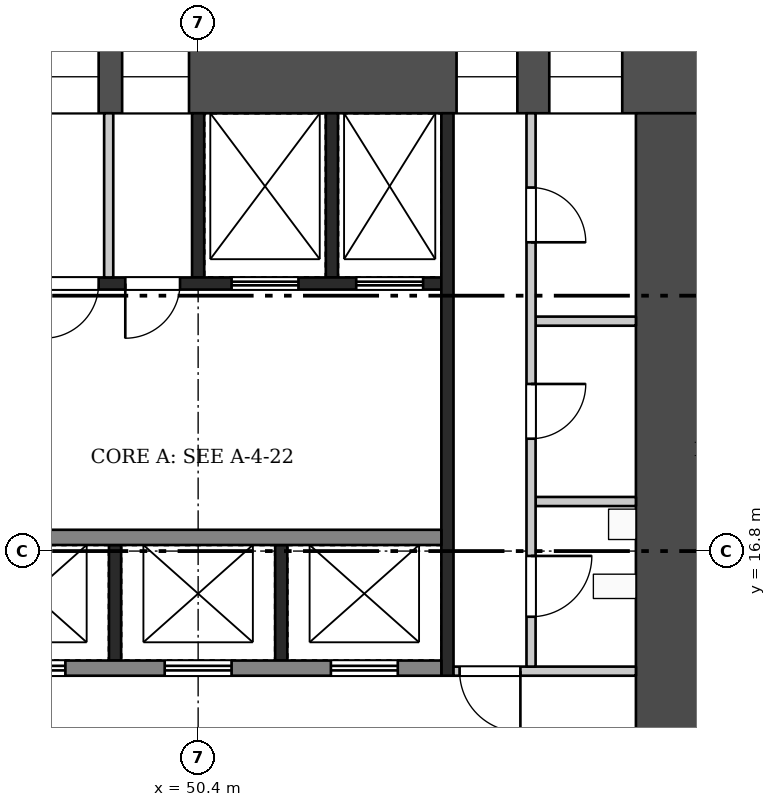
"""IFC4 building model, lengths in metres.
Left out: names, types, materials, properties, quantities, classifications, styles, units other than length and angle.
Written with IfcOpenShell. Run it as: python <this file> out.ifc"""

import sys

from ifc_helpers import new_model, si_unit, direction, frame, frame_2d, origin, place, context, subcontext, project, spatial, rectangle, extrude, element, fill, save


model = new_model("IFC4")
c1 = context("Model", 3, precision=1e-05, world=origin(), true_north=direction((0.0, 1.0)))
c2 = subcontext(c1, "Body", "Model", "MODEL_VIEW")
j1 = project(units=[si_unit("LENGTHUNIT", "METRE"), si_unit("PLANEANGLEUNIT", "RADIAN")], contexts=[c1])
p1 = place(None, origin())
s1 = spatial("IfcSite", under=j1, at=p1, CompositionType="ELEMENT")
p2 = place(p1, origin())
s2 = spatial("IfcBuilding", under=s1, at=p2, CompositionType="ELEMENT")
p3 = place(p2, frame((0.0, 0.0, 140.7)))
s3 = spatial("IfcBuildingStorey", under=s2, at=p3, CompositionType="ELEMENT", Elevation=140.7)
p4 = place(p3, frame((42.0, 24.6, 0.0), z_axis=(0.0, 0.0, 1.0), x_axis=(1.0, 0.0, 0.0)))
e1 = element("IfcWall", 1, at=p4, inside=s3, PredefinedType="SHEAR", context=c2, shape_type="SweptSolid", body=[
    extrude(rectangle(XDim=16.8, YDim=1.2, at=frame_2d((8.4, 0.0))), origin(), (0.0, 0.0, 1.0), 6.72),
])
p5 = place(p4, frame((1.8, 0.0, 0.5)))
e2 = element("IfcOpeningElement", 2, at=p5, cuts=e1, PredefinedType="OPENING", context=c2, shape_type="SweptSolid", body=[
    extrude(rectangle(XDim=1.8, YDim=2.4, at=frame_2d((0.9, 1.2))), frame((0.0, 0.61, 0.0), z_axis=(0.0, -1.0, 0.0), x_axis=(1.0, 0.0, 0.0)), (0.0, 0.0, 1.0), 1.22),
])
p6 = place(p4, frame((4.462, 0.0, 1.6)))
e3 = element("IfcOpeningElement", 3, at=p6, cuts=e1, PredefinedType="OPENING", context=c2, shape_type="SweptSolid", body=[
    extrude(rectangle(XDim=1.1, YDim=1.2, at=frame_2d((0.55, 0.6))), frame((0.0, 0.61, 0.0), z_axis=(0.0, -1.0, 0.0), x_axis=(1.0, 0.0, 0.0)), (0.0, 0.0, 1.0), 1.22),
])
p7 = place(p4, frame((5.864, 0.0, 1.6)))
e4 = element("IfcOpeningElement", 4, at=p7, cuts=e1, PredefinedType="OPENING", context=c2, shape_type="SweptSolid", body=[
    extrude(rectangle(XDim=0.9, YDim=1.2, at=frame_2d((0.45, 0.6))), frame((0.0, 0.61, 0.0), z_axis=(0.0, -1.0, 0.0), x_axis=(1.0, 0.0, 0.0)), (0.0, 0.0, 1.0), 1.22),
])
p8 = place(p4, frame((7.15, 0.0, 1.6)))
e5 = element("IfcOpeningElement", 5, at=p8, cuts=e1, PredefinedType="OPENING", context=c2, shape_type="SweptSolid", body=[
    extrude(rectangle(XDim=1.1, YDim=1.2, at=frame_2d((0.55, 0.6))), frame((0.0, 0.61, 0.0), z_axis=(0.0, -1.0, 0.0), x_axis=(1.0, 0.0, 0.0)), (0.0, 0.0, 1.0), 1.22),
])
p9 = place(p4, frame((12.65, 0.0, 0.6)))
e6 = element("IfcOpeningElement", 6, at=p9, cuts=e1, PredefinedType="OPENING", context=c2, shape_type="SweptSolid", body=[
    extrude(rectangle(XDim=1.0, YDim=2.1, at=frame_2d((0.5, 1.05))), frame((0.0, 0.61, 0.0), z_axis=(0.0, -1.0, 0.0), x_axis=(1.0, 0.0, 0.0)), (0.0, 0.0, 1.0), 1.22),
])
p10 = place(p4, frame((14.175, 0.0, 1.6)))
e7 = element("IfcOpeningElement", 7, at=p10, cuts=e1, PredefinedType="OPENING", context=c2, shape_type="SweptSolid", body=[
    extrude(rectangle(XDim=1.2, YDim=1.2, at=frame_2d((0.6, 0.6))), frame((0.0, 0.61, 0.0), z_axis=(0.0, -1.0, 0.0), x_axis=(1.0, 0.0, 0.0)), (0.0, 0.0, 1.0), 1.22),
])
p11 = place(p3, frame((58.2, 9.6, 0.0), z_axis=(0.0, 0.0, 1.0), x_axis=(0.0, 1.0, 0.0)))
e8 = element("IfcWall", 8, at=p11, inside=s3, PredefinedType="SHEAR", context=c2, shape_type="SweptSolid", body=[
    extrude(rectangle(XDim=14.4, YDim=1.2, at=frame_2d((7.2, 0.0))), origin(), (0.0, 0.0, 1.0), 6.72),
])
p12 = place(p11, frame((2.1, 0.0, 0.0)))
e9 = element("IfcOpeningElement", 9, at=p12, cuts=e8, PredefinedType="OPENING", context=c2, shape_type="SweptSolid", body=[
    extrude(rectangle(XDim=1.8, YDim=2.1, at=frame_2d((0.9, 1.05))), frame((0.0, 0.61, 0.0), z_axis=(0.0, -1.0, 0.0), x_axis=(1.0, 0.0, 0.0)), (0.0, 0.0, 1.0), 1.22),
])
for number, where, z_axis, x_axis in (
    (10, (49.033, 15.0, 0.0), (0.0, 0.0, 1.0), (0.0, 1.0, 0.0)),
    (11, (51.767, 15.0, 0.0), (0.0, 0.0, 1.0), (0.0, 1.0, 0.0)),
):
    element("IfcWall", number, at=place(p3, frame(where, z_axis=z_axis, x_axis=x_axis)), inside=s3, PredefinedType="SHEAR", context=c2, shape_type="SweptSolid", body=[
        extrude(rectangle(XDim=1.9, YDim=0.2, at=frame_2d((0.95, 0.0))), origin(), (0.0, 0.0, 1.0), 6.72),
    ])
p13 = place(p3, frame((46.4, 14.875, 0.0), z_axis=(0.0, 0.0, 1.0), x_axis=(1.0, 0.0, 0.0)))
e12 = element("IfcWall", 12, at=p13, inside=s3, PredefinedType="SHEAR", context=c2, shape_type="SweptSolid", body=[
    extrude(rectangle(XDim=8.0, YDim=0.25, at=frame_2d((4.0, 0.0))), origin(), (0.0, 0.0, 1.0), 6.72),
])
p14 = place(p13, frame((0.717, 0.0, 0.0)))
e13 = element("IfcOpeningElement", 13, at=p14, cuts=e12, PredefinedType="OPENING", context=c2, shape_type="SweptSolid", body=[
    extrude(rectangle(XDim=1.1, YDim=2.1, at=frame_2d((0.55, 1.05))), frame((0.0, 0.135, 0.0), z_axis=(0.0, -1.0, 0.0), x_axis=(1.0, 0.0, 0.0)), (0.0, 0.0, 1.0), 0.27),
])
p15 = place(p13, frame((3.45, 0.0, 0.0)))
e14 = element("IfcOpeningElement", 14, at=p15, cuts=e12, PredefinedType="OPENING", context=c2, shape_type="SweptSolid", body=[
    extrude(rectangle(XDim=1.1, YDim=2.1, at=frame_2d((0.55, 1.05))), frame((0.0, 0.135, 0.0), z_axis=(0.0, -1.0, 0.0), x_axis=(1.0, 0.0, 0.0)), (0.0, 0.0, 1.0), 0.27),
])
p16 = place(p13, frame((6.183, 0.0, 0.0)))
e15 = element("IfcOpeningElement", 15, at=p16, cuts=e12, PredefinedType="OPENING", context=c2, shape_type="SweptSolid", body=[
    extrude(rectangle(XDim=1.1, YDim=2.1, at=frame_2d((0.55, 1.05))), frame((0.0, 0.135, 0.0), z_axis=(0.0, -1.0, 0.0), x_axis=(1.0, 0.0, 0.0)), (0.0, 0.0, 1.0), 0.27),
])
p17 = place(p3, frame((46.4, 17.025, 0.0), z_axis=(0.0, 0.0, 1.0), x_axis=(1.0, 0.0, 0.0)))
e16 = element("IfcWall", 16, at=p17, inside=s3, PredefinedType="SHEAR", context=c2, shape_type="SweptSolid", body=[
    extrude(rectangle(XDim=8.0, YDim=0.25, at=frame_2d((4.0, 0.0))), origin(), (0.0, 0.0, 1.0), 6.72),
])
for number, where, z_axis, x_axis in (
    (17, (50.4, 21.3, 0.0), (0.0, 0.0, 1.0), (0.0, 1.0, 0.0)),
    (18, (52.6, 21.3, 0.0), (0.0, 0.0, 1.0), (0.0, 1.0, 0.0)),
):
    element("IfcWall", number, at=place(p3, frame(where, z_axis=z_axis, x_axis=x_axis)), inside=s3, PredefinedType="SHEAR", context=c2, shape_type="SweptSolid", body=[
        extrude(rectangle(XDim=2.7, YDim=0.2, at=frame_2d((1.35, 0.0))), origin(), (0.0, 0.0, 1.0), 6.72),
    ])
p18 = place(p3, frame((48.929, 21.3, 0.0), z_axis=(0.0, 0.0, 1.0), x_axis=(0.0, 1.0, 0.0)))
e19 = element("IfcWall", 19, at=p18, inside=s3, PredefinedType="PARTITIONING", context=c2, shape_type="SweptSolid", body=[
    extrude(rectangle(XDim=2.7, YDim=0.15, at=frame_2d((1.35, 0.0))), origin(), (0.0, 0.0, 1.0), 6.72),
])
p19 = place(p3, frame((46.4, 21.2, 0.0), z_axis=(0.0, 0.0, 1.0), x_axis=(1.0, 0.0, 0.0)))
e20 = element("IfcWall", 20, at=p19, inside=s3, PredefinedType="SHEAR", context=c2, shape_type="SweptSolid", body=[
    extrude(rectangle(XDim=8.0, YDim=0.2, at=frame_2d((4.0, 0.0))), origin(), (0.0, 0.0, 1.0), 6.72),
])
p20 = place(p19, frame((0.162, 0.0, 0.0)))
e21 = element("IfcOpeningElement", 21, at=p20, cuts=e20, PredefinedType="OPENING", context=c2, shape_type="SweptSolid", body=[
    extrude(rectangle(XDim=0.9, YDim=2.1, at=frame_2d((0.45, 1.05))), frame((0.0, 0.11, 0.0), z_axis=(0.0, -1.0, 0.0), x_axis=(1.0, 0.0, 0.0)), (0.0, 0.0, 1.0), 0.22),
])
p21 = place(p19, frame((1.464, 0.0, 0.0)))
e22 = element("IfcOpeningElement", 22, at=p21, cuts=e20, PredefinedType="OPENING", context=c2, shape_type="SweptSolid", body=[
    extrude(rectangle(XDim=0.9, YDim=2.1, at=frame_2d((0.45, 1.05))), frame((0.0, 0.11, 0.0), z_axis=(0.0, -1.0, 0.0), x_axis=(1.0, 0.0, 0.0)), (0.0, 0.0, 1.0), 0.22),
])
p22 = place(p19, frame((2.802, 0.0, 0.0)))
e23 = element("IfcOpeningElement", 23, at=p22, cuts=e20, PredefinedType="OPENING", context=c2, shape_type="SweptSolid", body=[
    extrude(rectangle(XDim=0.9, YDim=2.1, at=frame_2d((0.45, 1.05))), frame((0.0, 0.11, 0.0), z_axis=(0.0, -1.0, 0.0), x_axis=(1.0, 0.0, 0.0)), (0.0, 0.0, 1.0), 0.22),
])
p23 = place(p19, frame((4.55, 0.0, 0.0)))
e24 = element("IfcOpeningElement", 24, at=p23, cuts=e20, PredefinedType="OPENING", context=c2, shape_type="SweptSolid", body=[
    extrude(rectangle(XDim=1.1, YDim=2.1, at=frame_2d((0.55, 1.05))), frame((0.0, 0.11, 0.0), z_axis=(0.0, -1.0, 0.0), x_axis=(1.0, 0.0, 0.0)), (0.0, 0.0, 1.0), 0.22),
])
p24 = place(p19, frame((6.6, 0.0, 0.0)))
e25 = element("IfcOpeningElement", 25, at=p24, cuts=e20, PredefinedType="OPENING", context=c2, shape_type="SweptSolid", body=[
    extrude(rectangle(XDim=1.1, YDim=2.1, at=frame_2d((0.55, 1.05))), frame((0.0, 0.11, 0.0), z_axis=(0.0, -1.0, 0.0), x_axis=(1.0, 0.0, 0.0)), (0.0, 0.0, 1.0), 0.22),
])
p25 = place(p3, frame((54.5, 14.75, 0.0), z_axis=(0.0, 0.0, 1.0), x_axis=(0.0, 1.0, 0.0)))
e26 = element("IfcWall", 26, at=p25, inside=s3, PredefinedType="SHEAR", context=c2, shape_type="SweptSolid", body=[
    extrude(rectangle(XDim=9.25, YDim=0.2, at=frame_2d((4.625, 0.0))), origin(), (0.0, 0.0, 1.0), 6.72),
])
p26 = place(p3, frame((54.6, 14.825, 0.0), z_axis=(0.0, 0.0, 1.0), x_axis=(1.0, 0.0, 0.0)))
e27 = element("IfcWall", 27, at=p26, inside=s3, PredefinedType="PARTITIONING", context=c2, shape_type="SweptSolid", body=[
    extrude(rectangle(XDim=3.0, YDim=0.15, at=frame_2d((1.5, 0.0))), origin(), (0.0, 0.0, 1.0), 6.72),
])
p27 = place(p26, frame((0.1, 0.0, 0.0)))
e28 = element("IfcOpeningElement", 28, at=p27, cuts=e27, PredefinedType="OPENING", context=c2, shape_type="SweptSolid", body=[
    extrude(rectangle(XDim=1.0, YDim=2.1, at=frame_2d((0.5, 1.05))), frame((0.0, 0.085, 0.0), z_axis=(0.0, -1.0, 0.0), x_axis=(1.0, 0.0, 0.0)), (0.0, 0.0, 1.0), 0.17),
])
for number, where, z_axis, x_axis in (
    (29, (55.95, 17.615, 0.0), (0.0, 0.0, 1.0), (1.0, 0.0, 0.0)),
    (30, (55.95, 20.581, 0.0), (0.0, 0.0, 1.0), (1.0, 0.0, 0.0)),
):
    element("IfcWall", number, at=place(p3, frame(where, z_axis=z_axis, x_axis=x_axis)), inside=s3, PredefinedType="PARTITIONING", context=c2, shape_type="SweptSolid", body=[
        extrude(rectangle(XDim=1.65, YDim=0.15, at=frame_2d((0.825, 0.0))), origin(), (0.0, 0.0, 1.0), 6.72),
    ])
p28 = place(p3, frame((55.875, 14.9, 0.0), z_axis=(0.0, 0.0, 1.0), x_axis=(0.0, 1.0, 0.0)))
e31 = element("IfcWall", 31, at=p28, inside=s3, PredefinedType="PARTITIONING", context=c2, shape_type="SweptSolid", body=[
    extrude(rectangle(XDim=9.1, YDim=0.15, at=frame_2d((4.55, 0.0))), origin(), (0.0, 0.0, 1.0), 6.72),
])
p29 = place(p28, frame((0.82, 0.0, 0.0)))
e32 = element("IfcOpeningElement", 32, at=p29, cuts=e31, PredefinedType="OPENING", context=c2, shape_type="SweptSolid", body=[
    extrude(rectangle(XDim=1.0, YDim=2.1, at=frame_2d((0.5, 1.05))), frame((0.0, 0.085, 0.0), z_axis=(0.0, -1.0, 0.0), x_axis=(1.0, 0.0, 0.0)), (0.0, 0.0, 1.0), 0.17),
])
p30 = place(p28, frame((3.748, 0.0, 0.0)))
e33 = element("IfcOpeningElement", 33, at=p30, cuts=e31, PredefinedType="OPENING", context=c2, shape_type="SweptSolid", body=[
    extrude(rectangle(XDim=0.9, YDim=2.1, at=frame_2d((0.45, 1.05))), frame((0.0, 0.085, 0.0), z_axis=(0.0, -1.0, 0.0), x_axis=(1.0, 0.0, 0.0)), (0.0, 0.0, 1.0), 0.17),
])
p31 = place(p28, frame((6.978, 0.0, 0.0)))
e34 = element("IfcOpeningElement", 34, at=p31, cuts=e31, PredefinedType="OPENING", context=c2, shape_type="SweptSolid", body=[
    extrude(rectangle(XDim=0.9, YDim=2.1, at=frame_2d((0.45, 1.05))), frame((0.0, 0.085, 0.0), z_axis=(0.0, -1.0, 0.0), x_axis=(1.0, 0.0, 0.0)), (0.0, 0.0, 1.0), 0.17),
])
p32 = place(p14, origin())
e35 = element("IfcDoor", 35, at=p32, inside=s3, OperationType="DOUBLE_DOOR_SLIDING", PredefinedType="DOOR", context=c2, shape_type="SweptSolid", body=[
    extrude(rectangle(XDim=1.1, YDim=2.1, at=frame_2d((0.55, 1.05))), frame((0.0, 0.025, 0.0), z_axis=(0.0, -1.0, 0.0), x_axis=(1.0, 0.0, 0.0)), (0.0, 0.0, 1.0), 0.05),
])
fill(e13, e35)
p33 = place(p15, origin())
e36 = element("IfcDoor", 36, at=p33, inside=s3, OperationType="DOUBLE_DOOR_SLIDING", PredefinedType="DOOR", context=c2, shape_type="SweptSolid", body=[
    extrude(rectangle(XDim=1.1, YDim=2.1, at=frame_2d((0.55, 1.05))), frame((0.0, 0.025, 0.0), z_axis=(0.0, -1.0, 0.0), x_axis=(1.0, 0.0, 0.0)), (0.0, 0.0, 1.0), 0.05),
])
fill(e14, e36)
p34 = place(p16, origin())
e37 = element("IfcDoor", 37, at=p34, inside=s3, OperationType="DOUBLE_DOOR_SLIDING", PredefinedType="DOOR", context=c2, shape_type="SweptSolid", body=[
    extrude(rectangle(XDim=1.1, YDim=2.1, at=frame_2d((0.55, 1.05))), frame((0.0, 0.025, 0.0), z_axis=(0.0, -1.0, 0.0), x_axis=(1.0, 0.0, 0.0)), (0.0, 0.0, 1.0), 0.05),
])
fill(e15, e37)
p35 = place(p21, frame((0.9, 0.0, 0.0), z_axis=(0.0, 0.0, 1.0), x_axis=(-1.0, 0.0, 0.0)))
e38 = element("IfcDoor", 38, at=p35, inside=s3, OperationType="SINGLE_SWING_RIGHT", PredefinedType="DOOR", context=c2, shape_type="SweptSolid", body=[
    extrude(rectangle(XDim=0.9, YDim=2.1, at=frame_2d((0.45, 1.05))), frame((0.0, 0.025, 0.0), z_axis=(0.0, -1.0, 0.0), x_axis=(1.0, 0.0, 0.0)), (0.0, 0.0, 1.0), 0.05),
])
fill(e22, e38)
p36 = place(p22, frame((0.9, 0.0, 0.0), z_axis=(0.0, 0.0, 1.0), x_axis=(-1.0, 0.0, 0.0)))
e39 = element("IfcDoor", 39, at=p36, inside=s3, OperationType="SINGLE_SWING_RIGHT", PredefinedType="DOOR", context=c2, shape_type="SweptSolid", body=[
    extrude(rectangle(XDim=0.9, YDim=2.1, at=frame_2d((0.45, 1.05))), frame((0.0, 0.025, 0.0), z_axis=(0.0, -1.0, 0.0), x_axis=(1.0, 0.0, 0.0)), (0.0, 0.0, 1.0), 0.05),
])
fill(e23, e39)
p37 = place(p23, origin())
e40 = element("IfcDoor", 40, at=p37, inside=s3, OperationType="DOUBLE_DOOR_SLIDING", PredefinedType="DOOR", context=c2, shape_type="SweptSolid", body=[
    extrude(rectangle(XDim=1.1, YDim=2.1, at=frame_2d((0.55, 1.05))), frame((0.0, 0.025, 0.0), z_axis=(0.0, -1.0, 0.0), x_axis=(1.0, 0.0, 0.0)), (0.0, 0.0, 1.0), 0.05),
])
fill(e24, e40)
p38 = place(p24, origin())
e41 = element("IfcDoor", 41, at=p38, inside=s3, OperationType="DOUBLE_DOOR_SLIDING", PredefinedType="DOOR", context=c2, shape_type="SweptSolid", body=[
    extrude(rectangle(XDim=1.1, YDim=2.1, at=frame_2d((0.55, 1.05))), frame((0.0, 0.025, 0.0), z_axis=(0.0, -1.0, 0.0), x_axis=(1.0, 0.0, 0.0)), (0.0, 0.0, 1.0), 0.05),
])
fill(e25, e41)
p39 = place(p27, frame((1.0, 0.0, 0.0), z_axis=(0.0, 0.0, 1.0), x_axis=(-1.0, 0.0, 0.0)))
e42 = element("IfcDoor", 42, at=p39, inside=s3, OperationType="SINGLE_SWING_LEFT", PredefinedType="DOOR", context=c2, shape_type="SweptSolid", body=[
    extrude(rectangle(XDim=1.0, YDim=2.1, at=frame_2d((0.5, 1.05))), frame((0.0, 0.025, 0.0), z_axis=(0.0, -1.0, 0.0), x_axis=(1.0, 0.0, 0.0)), (0.0, 0.0, 1.0), 0.05),
])
fill(e28, e42)
p40 = place(p29, frame((1.0, 0.0, 0.0), z_axis=(0.0, 0.0, 1.0), x_axis=(-1.0, 0.0, 0.0)))
e43 = element("IfcDoor", 43, at=p40, inside=s3, OperationType="SINGLE_SWING_LEFT", PredefinedType="DOOR", context=c2, shape_type="SweptSolid", body=[
    extrude(rectangle(XDim=1.0, YDim=2.1, at=frame_2d((0.5, 1.05))), frame((0.0, 0.025, 0.0), z_axis=(0.0, -1.0, 0.0), x_axis=(1.0, 0.0, 0.0)), (0.0, 0.0, 1.0), 0.05),
])
fill(e32, e43)
p41 = place(p30, frame((0.9, 0.0, 0.0), z_axis=(0.0, 0.0, 1.0), x_axis=(-1.0, 0.0, 0.0)))
e44 = element("IfcDoor", 44, at=p41, inside=s3, OperationType="SINGLE_SWING_LEFT", PredefinedType="DOOR", context=c2, shape_type="SweptSolid", body=[
    extrude(rectangle(XDim=0.9, YDim=2.1, at=frame_2d((0.45, 1.05))), frame((0.0, 0.025, 0.0), z_axis=(0.0, -1.0, 0.0), x_axis=(1.0, 0.0, 0.0)), (0.0, 0.0, 1.0), 0.05),
])
fill(e33, e44)
p42 = place(p31, frame((0.9, 0.0, 0.0), z_axis=(0.0, 0.0, 1.0), x_axis=(-1.0, 0.0, 0.0)))
e45 = element("IfcDoor", 45, at=p42, inside=s3, OperationType="SINGLE_SWING_RIGHT", PredefinedType="DOOR", context=c2, shape_type="SweptSolid", body=[
    extrude(rectangle(XDim=0.9, YDim=2.1, at=frame_2d((0.45, 1.05))), frame((0.0, 0.025, 0.0), z_axis=(0.0, -1.0, 0.0), x_axis=(1.0, 0.0, 0.0)), (0.0, 0.0, 1.0), 0.05),
])
fill(e34, e45)
p43 = place(p7, origin())
e46 = element("IfcWindow", 46, at=p43, inside=s3, PartitioningType="SINGLE_PANEL", PredefinedType="WINDOW", context=c2, shape_type="SweptSolid", body=[
    extrude(rectangle(XDim=0.9, YDim=1.2, at=frame_2d((0.45, 0.6))), frame((0.0, 0.03, 0.0), z_axis=(0.0, -1.0, 0.0), x_axis=(1.0, 0.0, 0.0)), (0.0, 0.0, 1.0), 0.06),
])
fill(e4, e46)
p44 = place(p8, origin())
e47 = element("IfcWindow", 47, at=p44, inside=s3, PartitioningType="SINGLE_PANEL", PredefinedType="WINDOW", context=c2, shape_type="SweptSolid", body=[
    extrude(rectangle(XDim=1.1, YDim=1.2, at=frame_2d((0.55, 0.6))), frame((0.0, 0.03, 0.0), z_axis=(0.0, -1.0, 0.0), x_axis=(1.0, 0.0, 0.0)), (0.0, 0.0, 1.0), 0.06),
])
fill(e5, e47)
p45 = place(p9, origin())
e48 = element("IfcWindow", 48, at=p45, inside=s3, PartitioningType="SINGLE_PANEL", PredefinedType="WINDOW", context=c2, shape_type="SweptSolid", body=[
    extrude(rectangle(XDim=1.0, YDim=2.1, at=frame_2d((0.5, 1.05))), frame((0.0, 0.03, 0.0), z_axis=(0.0, -1.0, 0.0), x_axis=(1.0, 0.0, 0.0)), (0.0, 0.0, 1.0), 0.06),
])
fill(e6, e48)
p46 = place(p10, origin())
e49 = element("IfcWindow", 49, at=p46, inside=s3, PartitioningType="SINGLE_PANEL", PredefinedType="WINDOW", context=c2, shape_type="SweptSolid", body=[
    extrude(rectangle(XDim=1.2, YDim=1.2, at=frame_2d((0.6, 0.6))), frame((0.0, 0.03, 0.0), z_axis=(0.0, -1.0, 0.0), x_axis=(1.0, 0.0, 0.0)), (0.0, 0.0, 1.0), 0.06),
])
fill(e7, e49)
save(model, sys.argv[1])
